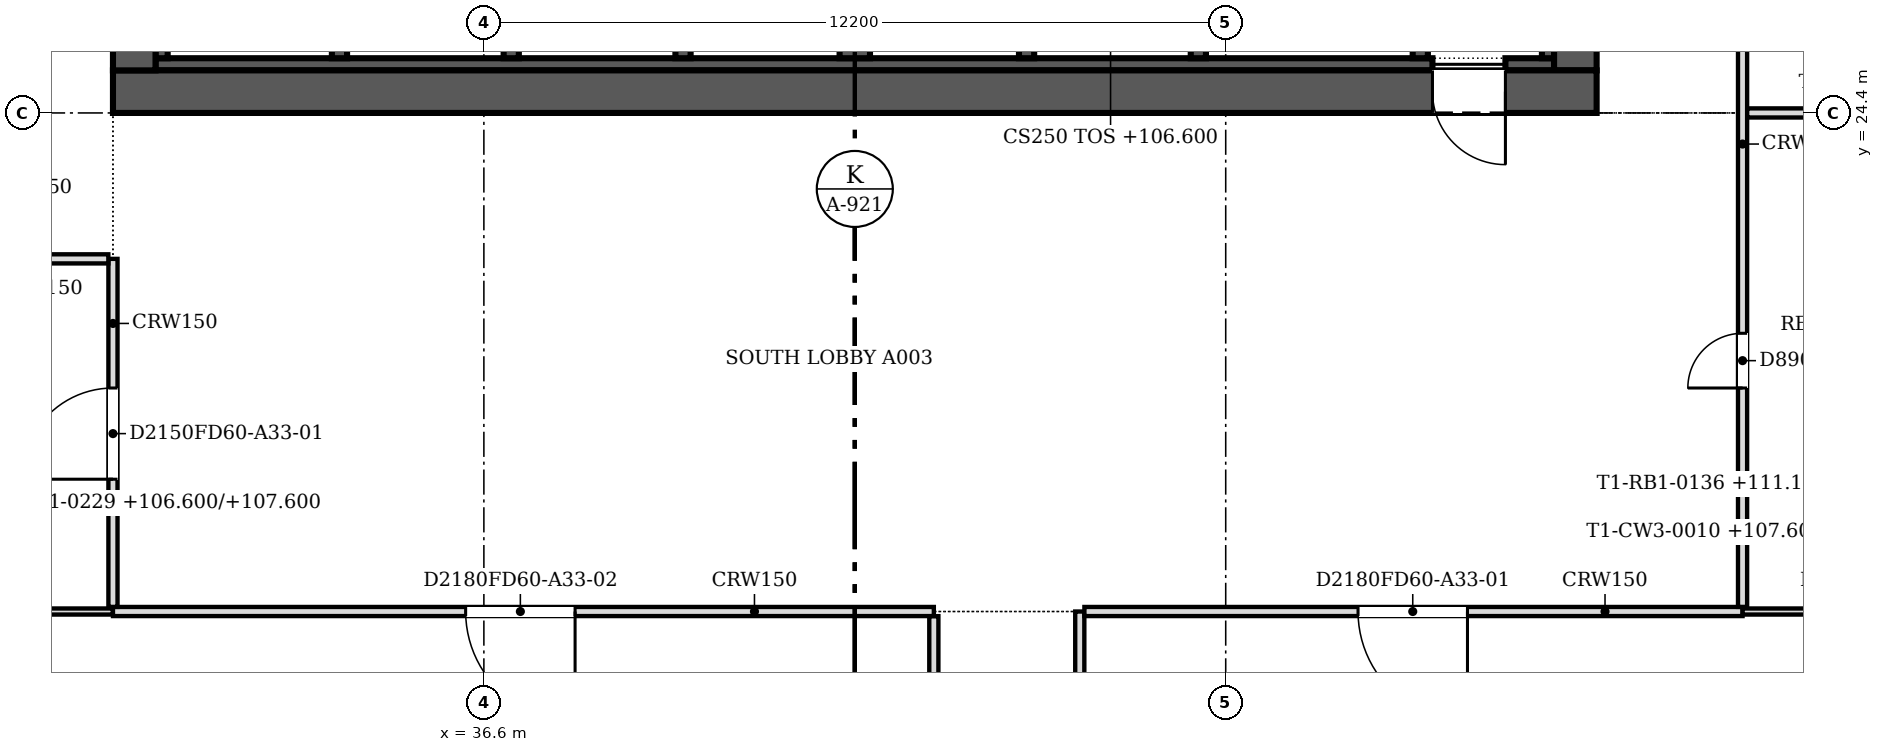
"""IFC4 building model, lengths in metres.
Left out: names, types, materials, properties, quantities, classifications, styles, units other than length and angle.
Written with IfcOpenShell. Run it as: python <this file> out.ifc"""

import sys

from ifc_helpers import new_model, si_unit, direction, frame, frame_2d, origin, place, context, subcontext, project, spatial, rectangle, extrude, source, transform, mapped, element, fill, save


model = new_model("IFC4")
c1 = context("Model", 3, precision=1e-05, world=origin(), true_north=direction((0.0, 1.0)))
c2 = subcontext(c1, "Body", "Model", "MODEL_VIEW")
j1 = project(units=[si_unit("LENGTHUNIT", "METRE"), si_unit("PLANEANGLEUNIT", "RADIAN")], contexts=[c1])
p1 = place(None, origin())
s1 = spatial("IfcSite", under=j1, at=p1, CompositionType="ELEMENT")
p2 = place(p1, origin())
s2 = spatial("IfcBuilding", under=s1, at=p2, CompositionType="ELEMENT")
p3 = place(p2, frame((0.0, 0.0, 106.6)))
s3 = spatial("IfcBuildingStorey", under=s2, at=p3, CompositionType="ELEMENT", Elevation=106.6)
p4 = place(p3, frame((54.9, 24.75, 0.0), z_axis=(0.0, 0.0, 1.0), x_axis=(-1.0, 0.0, 0.0)))
e1 = element("IfcWall", 1, at=p4, inside=s3, PredefinedType="SHEAR", context=c2, shape_type="SweptSolid", body=[
    extrude(rectangle(XDim=24.4, YDim=0.7, at=frame_2d((12.2, 0.0))), origin(), (0.0, 0.0, 1.0), 6.0),
])
m1 = source(origin(), c2, "Body", "SweptSolid", [
    extrude(rectangle(XDim=1.2, YDim=2.1, at=frame_2d((0.6, 1.05))), frame((0.0, 0.36, 0.0), z_axis=(0.0, -1.0, 0.0), x_axis=(1.0, 0.0, 0.0)), (0.0, 0.0, 1.0), 0.72),
])
p5 = place(p4, frame((1.5, 0.0, 0.0)))
e2 = element("IfcOpeningElement", 2, at=p5, cuts=e1, PredefinedType="OPENING", context=c2, shape_type="MappedRepresentation", body=[
    mapped(m1, transform((0.0, 0.0, 0.0), scale=1.0)),
])
p6 = place(p3, frame((30.85, 25.1, 0.0), z_axis=(0.0, 0.0, 1.0), x_axis=(0.0, 1.0, 0.0)))
e3 = element("IfcWall", 3, at=p6, inside=s3, PredefinedType="SHEAR", context=c2, shape_type="SweptSolid", body=[
    extrude(rectangle(XDim=23.0, YDim=0.7, at=frame_2d((11.5, 0.0))), origin(), (0.0, 0.0, 1.0), 6.0),
])
m2 = source(origin(), c2, "Body", "SweptSolid", [
    extrude(rectangle(XDim=2.1, YDim=2.4, at=frame_2d((1.05, 1.2))), frame((0.0, 0.36, 0.0), z_axis=(0.0, -1.0, 0.0), x_axis=(1.0, 0.0, 0.0)), (0.0, 0.0, 1.0), 0.72),
])
p7 = place(p6, frame((4.7, 0.0, 0.0)))
e4 = element("IfcOpeningElement", 4, at=p7, cuts=e3, PredefinedType="OPENING", context=c2, shape_type="MappedRepresentation", body=[
    mapped(m2, transform((0.0, 0.0, 0.0), scale=1.0)),
])
p8 = place(p6, frame((16.2, 0.0, 0.0)))
e5 = element("IfcOpeningElement", 5, at=p8, cuts=e3, PredefinedType="OPENING", context=c2, shape_type="MappedRepresentation", body=[
    mapped(m2, transform((0.0, 0.0, 0.0), scale=1.0)),
])
p9 = place(p3, frame((54.55, 48.1, 0.0), z_axis=(0.0, 0.0, 1.0), x_axis=(0.0, -1.0, 0.0)))
e6 = element("IfcWall", 6, at=p9, inside=s3, PredefinedType="SHEAR", context=c2, shape_type="SweptSolid", body=[
    extrude(rectangle(XDim=23.0, YDim=0.7, at=frame_2d((11.5, 0.0))), origin(), (0.0, 0.0, 1.0), 6.0),
])
p10 = place(p9, frame((4.8, 0.0, 0.0)))
e7 = element("IfcOpeningElement", 7, at=p10, cuts=e6, PredefinedType="OPENING", context=c2, shape_type="MappedRepresentation", body=[
    mapped(m1, transform((0.0, 0.0, 0.0), scale=1.0)),
])
p11 = place(p3, frame((31.2, 25.2, 0.0), z_axis=(0.0, 0.0, 1.0), x_axis=(1.0, 0.0, 0.0)))
e8 = element("IfcWall", 8, at=p11, inside=s3, PredefinedType="SOLIDWALL", context=c2, shape_type="SweptSolid", body=[
    extrude(rectangle(XDim=21.0, YDim=0.2, at=frame_2d((10.5, 0.0))), origin(), (0.0, 0.0, 1.0), 6.0),
])
p12 = place(p3, frame((53.4, 25.2, 0.0), z_axis=(0.0, 0.0, 1.0), x_axis=(1.0, 0.0, 0.0)))
e9 = element("IfcWall", 9, at=p12, inside=s3, PredefinedType="SOLIDWALL", context=c2, shape_type="SweptSolid", body=[
    extrude(rectangle(XDim=0.8, YDim=0.2, at=frame_2d((0.4, 0.0))), origin(), (0.0, 0.0, 1.0), 6.0),
])
p13 = place(p3, frame((31.3, 25.3, 0.0), z_axis=(0.0, 0.0, 1.0), x_axis=(0.0, 1.0, 0.0)))
e10 = element("IfcWall", 10, at=p13, inside=s3, PredefinedType="SOLIDWALL", context=c2, shape_type="SweptSolid", body=[
    extrude(rectangle(XDim=4.5, YDim=0.2, at=frame_2d((2.25, 0.0))), origin(), (0.0, 0.0, 1.0), 6.0),
])
p14 = place(p3, frame((54.1, 25.3, 0.0), z_axis=(0.0, 0.0, 1.0), x_axis=(0.0, 1.0, 0.0)))
e11 = element("IfcWall", 11, at=p14, inside=s3, PredefinedType="SOLIDWALL", context=c2, shape_type="SweptSolid", body=[
    extrude(rectangle(XDim=11.02, YDim=0.2, at=frame_2d((5.51, 0.0))), origin(), (0.0, 0.0, 1.0), 6.0),
])
p15 = place(p3, frame((42.7, 36.35, 0.0), z_axis=(0.0, 0.0, 1.0), x_axis=(0.0, -1.0, 0.0)))
e12 = element("IfcWall", 12, at=p15, inside=s3, PredefinedType="SHEAR", context=c2, shape_type="SweptSolid", body=[
    extrude(rectangle(XDim=11.05, YDim=0.5, at=frame_2d((5.525, 0.0))), origin(), (0.0, 0.0, 1.0), 6.0),
])
m3 = source(origin(), c2, "Body", "SweptSolid", [
    extrude(rectangle(XDim=0.9, YDim=2.1, at=frame_2d((0.45, 1.05))), frame((0.0, 0.26, 0.0), z_axis=(0.0, -1.0, 0.0), x_axis=(1.0, 0.0, 0.0)), (0.0, 0.0, 1.0), 0.52),
])
p16 = place(p15, frame((6.5, 0.0, 0.0)))
e13 = element("IfcOpeningElement", 13, at=p16, cuts=e12, PredefinedType="OPENING", context=c2, shape_type="MappedRepresentation", body=[
    mapped(m3, transform((0.0, 0.0, 0.0), scale=1.0)),
])
m4 = source(origin(), c2, "Body", "SweptSolid", [
    extrude(rectangle(XDim=1.1, YDim=2.1, at=frame_2d((0.55, 1.05))), frame((0.0, 0.26, 0.0), z_axis=(0.0, -1.0, 0.0), x_axis=(1.0, 0.0, 0.0)), (0.0, 0.0, 1.0), 0.52),
])
p17 = place(p15, frame((3.8, 0.0, 0.0)))
e14 = element("IfcOpeningElement", 14, at=p17, cuts=e12, PredefinedType="OPENING", context=c2, shape_type="MappedRepresentation", body=[
    mapped(m4, transform((0.0, 0.0, 0.0), scale=1.0)),
])
p18 = place(p3, frame((48.35, 36.35, 0.0), z_axis=(0.0, 0.0, 1.0), x_axis=(0.0, -1.0, 0.0)))
e15 = element("IfcWall", 15, at=p18, inside=s3, PredefinedType="SOLIDWALL", context=c2, shape_type="SweptSolid", body=[
    extrude(rectangle(XDim=11.05, YDim=0.25, at=frame_2d((5.525, 0.0))), origin(), (0.0, 0.0, 1.0), 6.0),
])
m5 = source(origin(), c2, "Body", "SweptSolid", [
    extrude(rectangle(XDim=1.2, YDim=2.1, at=frame_2d((0.6, 1.05))), frame((0.0, 0.135, 0.0), z_axis=(0.0, -1.0, 0.0), x_axis=(1.0, 0.0, 0.0)), (0.0, 0.0, 1.0), 0.27),
])
p19 = place(p18, frame((3.225, 0.0, 0.0)))
e16 = element("IfcOpeningElement", 16, at=p19, cuts=e15, PredefinedType="OPENING", context=c2, shape_type="MappedRepresentation", body=[
    mapped(m5, transform((0.0, 0.0, 0.0), scale=1.0)),
])
p20 = place(p3, frame((52.0, 25.3, 0.0), z_axis=(0.0, 0.0, 1.0), x_axis=(0.0, 1.0, 0.0)))
e17 = element("IfcWall", 17, at=p20, inside=s3, PredefinedType="SOLIDWALL", context=c2, shape_type="SweptSolid", body=[
    extrude(rectangle(XDim=7.975, YDim=0.25, at=frame_2d((3.987, 0.0))), origin(), (0.0, 0.0, 1.0), 6.0),
])
p21 = place(p20, frame((6.625, 0.0, 0.0)))
e18 = element("IfcOpeningElement", 18, at=p21, cuts=e17, PredefinedType="OPENING", context=c2, shape_type="MappedRepresentation", body=[
    mapped(m5, transform((0.0, 0.0, 0.0), scale=1.0)),
])
for number, where, z_axis, x_axis in (
    (19, (34.225, 25.3, 0.0), (0.0, 0.0, 1.0), (0.0, 1.0, 0.0)),
    (20, (37.05, 25.3, 0.0), (0.0, 0.0, 1.0), (0.0, 1.0, 0.0)),
    (21, (39.875, 25.3, 0.0), (0.0, 0.0, 1.0), (0.0, 1.0, 0.0)),
):
    element("IfcWall", number, at=place(p3, frame(where, z_axis=z_axis, x_axis=x_axis)), inside=s3, PredefinedType="SOLIDWALL", context=c2, shape_type="SweptSolid", body=[
        extrude(rectangle(XDim=2.875, YDim=0.25, at=frame_2d((1.438, 0.0))), origin(), (0.0, 0.0, 1.0), 5.8),
    ])
p22 = place(p3, frame((45.525, 25.3, 0.0), z_axis=(0.0, 0.0, 1.0), x_axis=(0.0, 1.0, 0.0)))
e22 = element("IfcWall", 22, at=p22, inside=s3, PredefinedType="SOLIDWALL", context=c2, shape_type="SweptSolid", body=[
    extrude(rectangle(XDim=2.875, YDim=0.25, at=frame_2d((1.438, 0.0))), origin(), (0.0, 0.0, 1.0), 6.0),
])
p23 = place(p3, frame((44.0, 0.5, 0.0), z_axis=(0.0, 0.0, 1.0), x_axis=(0.0, 1.0, 0.0)))
e23 = element("IfcWall", 23, at=p23, inside=s3, PredefinedType="PARTITIONING", context=c2, shape_type="SweptSolid", body=[
    extrude(rectangle(XDim=15.624, YDim=0.15, at=frame_2d((7.812, 0.0))), origin(), (0.0, 0.0, 1.0), 5.167),
])
m6 = source(origin(), c2, "Body", "SweptSolid", [
    extrude(rectangle(XDim=1.2, YDim=2.1, at=frame_2d((0.6, 1.05))), frame((0.0, 0.085, 0.0), z_axis=(0.0, -1.0, 0.0), x_axis=(1.0, 0.0, 0.0)), (0.0, 0.0, 1.0), 0.17),
])
p24 = place(p23, frame((2.4, 0.0, 0.0)))
e24 = element("IfcOpeningElement", 24, at=p24, cuts=e23, PredefinedType="OPENING", context=c2, shape_type="MappedRepresentation", body=[
    mapped(m6, transform((0.0, 0.0, 0.0), scale=1.0)),
])
p25 = place(p3, frame((46.4, 4.2, 0.0), z_axis=(0.0, 0.0, 1.0), x_axis=(0.0, 1.0, 0.0)))
e25 = element("IfcWall", 25, at=p25, inside=s3, PredefinedType="PARTITIONING", context=c2, shape_type="SweptSolid", body=[
    extrude(rectangle(XDim=12.0, YDim=0.15, at=frame_2d((6.0, 0.0))), origin(), (0.0, 0.0, 1.0), 5.167),
])
p26 = place(p3, frame((24.951, 16.2, 0.0), z_axis=(0.0, 0.0, 1.0), x_axis=(1.0, 0.0, 0.0)))
e26 = element("IfcWall", 26, at=p26, inside=s3, PredefinedType="PARTITIONING", context=c2, shape_type="SweptSolid", body=[
    extrude(rectangle(XDim=5.548, YDim=0.1, at=frame_2d((2.774, 0.0))), origin(), (0.0, 0.0, 1.0), 5.167),
])
p27 = place(p3, frame((44.0, 16.2, 0.0), z_axis=(0.0, 0.0, 1.0), x_axis=(-1.0, 0.0, 0.0)))
e27 = element("IfcWall", 27, at=p27, inside=s3, PredefinedType="PARTITIONING", context=c2, shape_type="SweptSolid", body=[
    extrude(rectangle(XDim=13.5, YDim=0.15, at=frame_2d((6.75, 0.0))), origin(), (0.0, 0.0, 1.0), 5.167),
])
m7 = source(origin(), c2, "Body", "SweptSolid", [
    extrude(rectangle(XDim=1.8, YDim=2.1, at=frame_2d((0.9, 1.05))), frame((0.0, 0.085, 0.0), z_axis=(0.0, -1.0, 0.0), x_axis=(1.0, 0.0, 0.0)), (0.0, 0.0, 1.0), 0.17),
])
p28 = place(p27, frame((5.9, 0.0, 0.0)))
e28 = element("IfcOpeningElement", 28, at=p28, cuts=e27, PredefinedType="OPENING", context=c2, shape_type="MappedRepresentation", body=[
    mapped(m7, transform((0.0, 0.0, 0.0), scale=1.0)),
])
p29 = place(p3, frame((57.3, 16.2, 0.0), z_axis=(0.0, 0.0, 1.0), x_axis=(-1.0, 0.0, 0.0)))
e29 = element("IfcWall", 29, at=p29, inside=s3, PredefinedType="PARTITIONING", context=c2, shape_type="SweptSolid", body=[
    extrude(rectangle(XDim=10.824, YDim=0.15, at=frame_2d((5.412, 0.0))), origin(), (0.0, 0.0, 1.0), 5.167),
])
p30 = place(p29, frame((4.524, 0.0, 0.0)))
e30 = element("IfcOpeningElement", 30, at=p30, cuts=e29, PredefinedType="OPENING", context=c2, shape_type="MappedRepresentation", body=[
    mapped(m7, transform((0.0, 0.0, 0.0), scale=1.0)),
])
p31 = place(p3, frame((57.301, 16.2, 0.0), z_axis=(0.0, 0.0, 1.0), x_axis=(1.0, 0.0, 0.0)))
e31 = element("IfcWall", 31, at=p31, inside=s3, PredefinedType="PARTITIONING", context=c2, shape_type="SweptSolid", body=[
    extrude(rectangle(XDim=3.199, YDim=0.1, at=frame_2d((1.6, 0.0))), origin(), (0.0, 0.0, 1.0), 5.167),
])
p32 = place(p3, frame((30.5, 16.276, 0.0), z_axis=(0.0, 0.0, 1.0), x_axis=(0.0, 1.0, 0.0)))
e32 = element("IfcWall", 32, at=p32, inside=s3, PredefinedType="PARTITIONING", context=c2, shape_type="SweptSolid", body=[
    extrude(rectangle(XDim=5.724, YDim=0.15, at=frame_2d((2.862, 0.0))), origin(), (0.0, 0.0, 1.0), 5.167),
])
m8 = source(origin(), c2, "Body", "SweptSolid", [
    extrude(rectangle(XDim=1.5, YDim=2.1, at=frame_2d((0.75, 1.05))), frame((0.0, 0.085, 0.0), z_axis=(0.0, -1.0, 0.0), x_axis=(1.0, 0.0, 0.0)), (0.0, 0.0, 1.0), 0.17),
])
p33 = place(p32, frame((2.1, 0.0, 0.0)))
e33 = element("IfcOpeningElement", 33, at=p33, cuts=e32, PredefinedType="OPENING", context=c2, shape_type="MappedRepresentation", body=[
    mapped(m8, transform((0.0, 0.0, 0.0), scale=1.0)),
])
p34 = place(p3, frame((57.3, 30.6, 0.0), z_axis=(0.0, 0.0, 1.0), x_axis=(0.0, -1.0, 0.0)))
e34 = element("IfcWall", 34, at=p34, inside=s3, PredefinedType="PARTITIONING", context=c2, shape_type="SweptSolid", body=[
    extrude(rectangle(XDim=14.324, YDim=0.15, at=frame_2d((7.162, 0.0))), origin(), (0.0, 0.0, 1.0), 5.167),
])
m9 = source(origin(), c2, "Body", "SweptSolid", [
    extrude(rectangle(XDim=0.9, YDim=2.1, at=frame_2d((0.45, 1.05))), frame((0.0, 0.085, 0.0), z_axis=(0.0, -1.0, 0.0), x_axis=(1.0, 0.0, 0.0)), (0.0, 0.0, 1.0), 0.17),
])
p35 = place(p34, frame((2.699, 0.0, 0.0)))
e35 = element("IfcOpeningElement", 35, at=p35, cuts=e34, PredefinedType="OPENING", context=c2, shape_type="MappedRepresentation", body=[
    mapped(m9, transform((0.0, 0.0, 0.0), scale=1.0)),
])
p36 = place(p34, frame((9.824, 0.0, 0.0)))
e36 = element("IfcOpeningElement", 36, at=p36, cuts=e34, PredefinedType="OPENING", context=c2, shape_type="MappedRepresentation", body=[
    mapped(m9, transform((0.0, 0.0, 0.0), scale=1.0)),
])
p37 = place(p3, frame((28.176, 22.0, 0.0), z_axis=(0.0, 0.0, 1.0), x_axis=(1.0, 0.0, 0.0)))
e37 = element("IfcWall", 37, at=p37, inside=s3, PredefinedType="PARTITIONING", context=c2, shape_type="SweptSolid", body=[
    extrude(rectangle(XDim=2.248, YDim=0.15, at=frame_2d((1.124, 0.0))), origin(), (0.0, 0.0, 1.0), 5.167),
])
p38 = place(p3, frame((57.376, 24.4, 0.0), z_axis=(0.0, 0.0, 1.0), x_axis=(1.0, 0.0, 0.0)))
e38 = element("IfcWall", 38, at=p38, inside=s3, PredefinedType="PARTITIONING", context=c2, shape_type="SweptSolid", body=[
    extrude(rectangle(XDim=3.124, YDim=0.15, at=frame_2d((1.562, 0.0))), origin(), (0.0, 0.0, 1.0), 5.167),
])
m10 = source(origin(), c2, "Body", "SweptSolid", [
    extrude(rectangle(XDim=1.2, YDim=2.1, at=frame_2d((0.6, 1.05))), frame((0.0, 0.025, 0.0), z_axis=(0.0, -1.0, 0.0), x_axis=(1.0, 0.0, 0.0)), (0.0, 0.0, 1.0), 0.05),
])
p39 = place(p5, origin())
e39 = element("IfcDoor", 39, at=p39, inside=s3, OperationType="SINGLE_SWING_LEFT", PredefinedType="DOOR", context=c2, shape_type="MappedRepresentation", body=[
    mapped(m10, transform((0.0, 0.0, 0.0), scale=1.0)),
])
fill(e2, e39)
m11 = source(origin(), c2, "Body", "SweptSolid", [
    extrude(rectangle(XDim=1.5, YDim=2.1, at=frame_2d((0.75, 1.05))), frame((0.0, 0.025, 0.0), z_axis=(0.0, -1.0, 0.0), x_axis=(1.0, 0.0, 0.0)), (0.0, 0.0, 1.0), 0.05),
])
p40 = place(p33, origin())
e40 = element("IfcDoor", 40, at=p40, inside=s3, OperationType="SINGLE_SWING_LEFT", PredefinedType="DOOR", context=c2, shape_type="MappedRepresentation", body=[
    mapped(m11, transform((0.0, 0.0, 0.0), scale=1.0)),
])
fill(e33, e40)
m12 = source(origin(), c2, "Body", "SweptSolid", [
    extrude(rectangle(XDim=0.9, YDim=2.1, at=frame_2d((0.45, 1.05))), frame((0.0, 0.025, 0.0), z_axis=(0.0, -1.0, 0.0), x_axis=(1.0, 0.0, 0.0)), (0.0, 0.0, 1.0), 0.05),
])
p41 = place(p36, origin())
e41 = element("IfcDoor", 41, at=p41, inside=s3, OperationType="SINGLE_SWING_RIGHT", PredefinedType="DOOR", context=c2, shape_type="MappedRepresentation", body=[
    mapped(m12, transform((0.0, 0.0, 0.0), scale=1.0)),
])
fill(e36, e41)
m13 = source(origin(), c2, "Body", "SweptSolid", [
    extrude(rectangle(XDim=1.8, YDim=2.1, at=frame_2d((0.9, 1.05))), frame((0.0, 0.025, 0.0), z_axis=(0.0, -1.0, 0.0), x_axis=(1.0, 0.0, 0.0)), (0.0, 0.0, 1.0), 0.05),
])
p42 = place(p30, origin())
e42 = element("IfcDoor", 42, at=p42, inside=s3, OperationType="DOUBLE_DOOR_SINGLE_SWING", PredefinedType="DOOR", context=c2, shape_type="MappedRepresentation", body=[
    mapped(m13, transform((0.0, 0.0, 0.0), scale=1.0)),
])
fill(e30, e42)
p43 = place(p28, origin())
e43 = element("IfcDoor", 43, at=p43, inside=s3, OperationType="DOUBLE_DOOR_SINGLE_SWING", PredefinedType="DOOR", context=c2, shape_type="MappedRepresentation", body=[
    mapped(m13, transform((0.0, 0.0, 0.0), scale=1.0)),
])
fill(e28, e43)
save(model, sys.argv[1])
